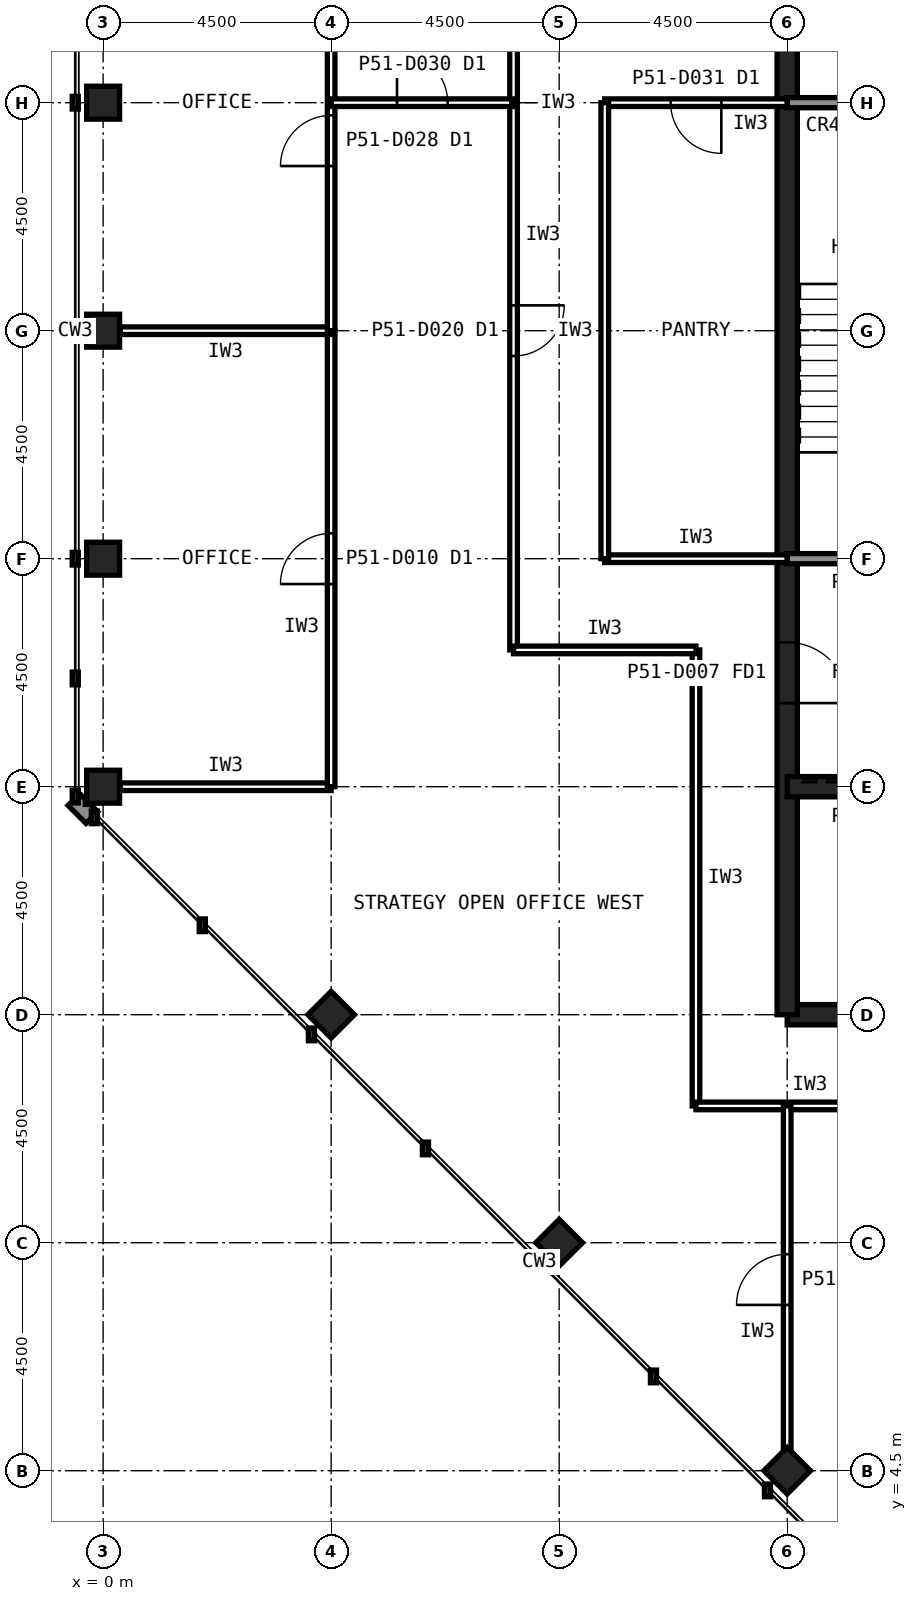
"""IFC4 building model, lengths in metres.
Left out: names, types, materials, properties, quantities, classifications, styles, units other than length and angle.
Written with IfcOpenShell. Run it as: python <this file> out.ifc"""

import sys

from ifc_helpers import new_model, si_unit, direction, frame, frame_2d, origin, origin_2d, place, context, subcontext, project, spatial, rectangle, hollow_rectangle, extrude, element, fill, save


model = new_model("IFC4")
c1 = context("Model", 3, precision=1e-05, world=origin(), true_north=direction((0.0, 1.0)))
c2 = subcontext(c1, "Body", "Model", "MODEL_VIEW")
j1 = project(units=[si_unit("LENGTHUNIT", "METRE"), si_unit("PLANEANGLEUNIT", "RADIAN")], contexts=[c1])
p1 = place(None, origin())
s1 = spatial("IfcSite", under=j1, at=p1, CompositionType="ELEMENT")
p2 = place(p1, origin())
s2 = spatial("IfcBuilding", under=s1, at=p2, CompositionType="ELEMENT")
p3 = place(p2, frame((0.0, 0.0, 214.6)))
s3 = spatial("IfcBuildingStorey", under=s2, at=p3, CompositionType="ELEMENT", Elevation=214.6)
for number, where, z_axis, x_axis in (
    (1, (0.0, 31.5, 0.0), (0.0, 0.0, 1.0), (1.0, 0.0, 0.0)),
    (2, (0.0, 27.0, 0.0), (0.0, 0.0, 1.0), (1.0, 0.0, 0.0)),
    (3, (0.0, 22.5, 0.0), (0.0, 0.0, 1.0), (1.0, 0.0, 0.0)),
    (4, (0.0, 18.0, 0.0), (0.0, 0.0, 1.0), (1.0, 0.0, 0.0)),
    (5, (13.5, 4.5, 0.0), (0.0, 0.0, 1.0), (0.707, 0.707, 0.0)),
    (6, (9.0, 9.0, 0.0), (0.0, 0.0, 1.0), (0.707, 0.707, 0.0)),
    (7, (4.5, 13.5, 0.0), (0.0, 0.0, 1.0), (0.707, 0.707, 0.0)),
):
    element("IfcColumn", number, at=place(p3, frame(where, z_axis=z_axis, x_axis=x_axis)), inside=s3, PredefinedType="COLUMN", context=c2, shape_type="SweptSolid", body=[
        extrude(hollow_rectangle(XDim=0.65, YDim=0.65, WallThickness=0.032, at=origin_2d()), origin(), (0.0, 0.0, 1.0), 4.0),
    ])
p4 = place(p3, frame((13.5, 13.5, 0.0), z_axis=(0.0, 0.0, 1.0), x_axis=(1.0, 0.0, 0.0)))
e8 = element("IfcWall", 8, at=p4, inside=s3, PredefinedType="SHEAR", context=c2, shape_type="SweptSolid", body=[
    extrude(rectangle(XDim=27.0, YDim=0.4, at=frame_2d((13.5, 0.0))), origin(), (0.0, 0.0, 1.0), 4.0),
])
p5 = place(p3, frame((13.5, 40.5, 0.0), z_axis=(0.0, 0.0, 1.0), x_axis=(0.0, -1.0, 0.0)))
e9 = element("IfcWall", 9, at=p5, inside=s3, PredefinedType="SHEAR", context=c2, shape_type="SweptSolid", body=[
    extrude(rectangle(XDim=27.0, YDim=0.4, at=frame_2d((13.5, 0.0))), origin(), (0.0, 0.0, 1.0), 4.0),
])
p6 = place(p5, frame((19.65, 0.0, 0.0)))
e10 = element("IfcOpeningElement", 10, at=p6, cuts=e9, PredefinedType="OPENING", context=c2, shape_type="SweptSolid", body=[
    extrude(rectangle(XDim=1.2, YDim=2.1, at=frame_2d((0.6, 1.05))), frame((0.0, 0.21, 0.0), z_axis=(0.0, -1.0, 0.0), x_axis=(1.0, 0.0, 0.0)), (0.0, 0.0, 1.0), 0.42),
])
p7 = place(p5, frame((5.85, 0.0, 0.0)))
e11 = element("IfcOpeningElement", 11, at=p7, cuts=e9, PredefinedType="OPENING", context=c2, shape_type="SweptSolid", body=[
    extrude(rectangle(XDim=1.8, YDim=2.1, at=frame_2d((0.9, 1.05))), frame((0.0, 0.21, 0.0), z_axis=(0.0, -1.0, 0.0), x_axis=(1.0, 0.0, 0.0)), (0.0, 0.0, 1.0), 0.42),
])
p8 = place(p3, frame((13.5, 18.0, 0.0), z_axis=(0.0, 0.0, 1.0), x_axis=(1.0, 0.0, 0.0)))
e12 = element("IfcWall", 12, at=p8, inside=s3, PredefinedType="SHEAR", context=c2, shape_type="SweptSolid", body=[
    extrude(rectangle(XDim=27.0, YDim=0.4, at=frame_2d((13.5, 0.0))), origin(), (0.0, 0.0, 1.0), 4.0),
])
p9 = place(p8, frame((24.3, 0.0, 0.0)))
e13 = element("IfcOpeningElement", 13, at=p9, cuts=e12, PredefinedType="OPENING", context=c2, shape_type="SweptSolid", body=[
    extrude(rectangle(XDim=0.9, YDim=2.1, at=frame_2d((0.45, 1.05))), frame((0.0, 0.21, 0.0), z_axis=(0.0, -1.0, 0.0), x_axis=(1.0, 0.0, 0.0)), (0.0, 0.0, 1.0), 0.42),
])
p10 = place(p8, frame((5.45, 0.0, 0.0)))
e14 = element("IfcOpeningElement", 14, at=p10, cuts=e12, PredefinedType="OPENING", context=c2, shape_type="SweptSolid", body=[
    extrude(rectangle(XDim=1.1, YDim=2.1, at=frame_2d((0.55, 1.05))), frame((0.0, 0.21, 0.0), z_axis=(0.0, -1.0, 0.0), x_axis=(1.0, 0.0, 0.0)), (0.0, 0.0, 1.0), 0.42),
])
p11 = place(p8, frame((8.45, 0.0, 0.0)))
e15 = element("IfcOpeningElement", 15, at=p11, cuts=e12, PredefinedType="OPENING", context=c2, shape_type="SweptSolid", body=[
    extrude(rectangle(XDim=1.1, YDim=2.1, at=frame_2d((0.55, 1.05))), frame((0.0, 0.21, 0.0), z_axis=(0.0, -1.0, 0.0), x_axis=(1.0, 0.0, 0.0)), (0.0, 0.0, 1.0), 0.42),
])
p12 = place(p8, frame((11.45, 0.0, 0.0)))
e16 = element("IfcOpeningElement", 16, at=p12, cuts=e12, PredefinedType="OPENING", context=c2, shape_type="SweptSolid", body=[
    extrude(rectangle(XDim=1.1, YDim=2.1, at=frame_2d((0.55, 1.05))), frame((0.0, 0.21, 0.0), z_axis=(0.0, -1.0, 0.0), x_axis=(1.0, 0.0, 0.0)), (0.0, 0.0, 1.0), 0.42),
])
p13 = place(p8, frame((14.45, 0.0, 0.0)))
e17 = element("IfcOpeningElement", 17, at=p13, cuts=e12, PredefinedType="OPENING", context=c2, shape_type="SweptSolid", body=[
    extrude(rectangle(XDim=1.1, YDim=2.1, at=frame_2d((0.55, 1.05))), frame((0.0, 0.21, 0.0), z_axis=(0.0, -1.0, 0.0), x_axis=(1.0, 0.0, 0.0)), (0.0, 0.0, 1.0), 0.42),
])
p14 = place(p8, frame((17.45, 0.0, 0.0)))
e18 = element("IfcOpeningElement", 18, at=p14, cuts=e12, PredefinedType="OPENING", context=c2, shape_type="SweptSolid", body=[
    extrude(rectangle(XDim=1.1, YDim=2.1, at=frame_2d((0.55, 1.05))), frame((0.0, 0.21, 0.0), z_axis=(0.0, -1.0, 0.0), x_axis=(1.0, 0.0, 0.0)), (0.0, 0.0, 1.0), 0.42),
])
p15 = place(p8, frame((20.45, 0.0, 0.0)))
e19 = element("IfcOpeningElement", 19, at=p15, cuts=e12, PredefinedType="OPENING", context=c2, shape_type="SweptSolid", body=[
    extrude(rectangle(XDim=1.1, YDim=2.1, at=frame_2d((0.55, 1.05))), frame((0.0, 0.21, 0.0), z_axis=(0.0, -1.0, 0.0), x_axis=(1.0, 0.0, 0.0)), (0.0, 0.0, 1.0), 0.42),
])
p16 = place(p8, frame((1.6, 0.0, 0.0)))
e20 = element("IfcOpeningElement", 20, at=p16, cuts=e12, PredefinedType="OPENING", context=c2, shape_type="SweptSolid", body=[
    extrude(rectangle(XDim=1.3, YDim=2.2, at=frame_2d((0.65, 1.1))), frame((0.0, 0.21, 0.0), z_axis=(0.0, -1.0, 0.0), x_axis=(1.0, 0.0, 0.0)), (0.0, 0.0, 1.0), 0.42),
])
p17 = place(p3, frame((13.5, 22.5, 0.0), z_axis=(0.0, 0.0, 1.0), x_axis=(1.0, 0.0, 0.0)))
e21 = element("IfcWall", 21, at=p17, inside=s3, PredefinedType="SOLIDWALL", context=c2, shape_type="SweptSolid", body=[
    extrude(rectangle(XDim=27.0, YDim=0.2, at=frame_2d((13.5, 0.0))), origin(), (0.0, 0.0, 1.0), 3.84),
])
p18 = place(p17, frame((1.65, 0.0, 0.0)))
e22 = element("IfcOpeningElement", 22, at=p18, cuts=e21, PredefinedType="OPENING", context=c2, shape_type="SweptSolid", body=[
    extrude(rectangle(XDim=1.2, YDim=2.1, at=frame_2d((0.6, 1.05))), frame((0.0, 0.11, 0.0), z_axis=(0.0, -1.0, 0.0), x_axis=(1.0, 0.0, 0.0)), (0.0, 0.0, 1.0), 0.22),
])
p19 = place(p17, frame((6.025, 0.0, 0.0)))
e23 = element("IfcOpeningElement", 23, at=p19, cuts=e21, PredefinedType="OPENING", context=c2, shape_type="SweptSolid", body=[
    extrude(rectangle(XDim=1.0, YDim=2.1, at=frame_2d((0.5, 1.05))), frame((0.0, 0.11, 0.0), z_axis=(0.0, -1.0, 0.0), x_axis=(1.0, 0.0, 0.0)), (0.0, 0.0, 1.0), 0.22),
])
p20 = place(p17, frame((10.525, 0.0, 0.0)))
e24 = element("IfcOpeningElement", 24, at=p20, cuts=e21, PredefinedType="OPENING", context=c2, shape_type="SweptSolid", body=[
    extrude(rectangle(XDim=1.0, YDim=2.1, at=frame_2d((0.5, 1.05))), frame((0.0, 0.11, 0.0), z_axis=(0.0, -1.0, 0.0), x_axis=(1.0, 0.0, 0.0)), (0.0, 0.0, 1.0), 0.22),
])
p21 = place(p17, frame((19.75, 0.0, 0.0)))
e25 = element("IfcOpeningElement", 25, at=p21, cuts=e21, PredefinedType="OPENING", context=c2, shape_type="SweptSolid", body=[
    extrude(rectangle(XDim=1.0, YDim=2.1, at=frame_2d((0.5, 1.05))), frame((0.0, 0.11, 0.0), z_axis=(0.0, -1.0, 0.0), x_axis=(1.0, 0.0, 0.0)), (0.0, 0.0, 1.0), 0.22),
])
p22 = place(p17, frame((15.05, 0.0, 0.0)))
e26 = element("IfcOpeningElement", 26, at=p22, cuts=e21, PredefinedType="OPENING", context=c2, shape_type="SweptSolid", body=[
    extrude(rectangle(XDim=1.4, YDim=2.4, at=frame_2d((0.7, 1.2))), frame((0.0, 0.11, 0.0), z_axis=(0.0, -1.0, 0.0), x_axis=(1.0, 0.0, 0.0)), (0.0, 0.0, 1.0), 0.22),
])
p23 = place(p3, frame((13.5, 31.5, 0.0), z_axis=(0.0, 0.0, 1.0), x_axis=(1.0, 0.0, 0.0)))
e27 = element("IfcWall", 27, at=p23, inside=s3, PredefinedType="SOLIDWALL", context=c2, shape_type="SweptSolid", body=[
    extrude(rectangle(XDim=27.0, YDim=0.2, at=frame_2d((13.5, 0.0))), origin(), (0.0, 0.0, 1.0), 3.84),
])
p24 = place(p23, frame((24.15, 0.0, 0.0)))
e28 = element("IfcOpeningElement", 28, at=p24, cuts=e27, PredefinedType="OPENING", context=c2, shape_type="SweptSolid", body=[
    extrude(rectangle(XDim=1.2, YDim=2.1, at=frame_2d((0.6, 1.05))), frame((0.0, 0.11, 0.0), z_axis=(0.0, -1.0, 0.0), x_axis=(1.0, 0.0, 0.0)), (0.0, 0.0, 1.0), 0.22),
])
p25 = place(p23, frame((15.3, 0.0, 0.0)))
e29 = element("IfcOpeningElement", 29, at=p25, cuts=e27, PredefinedType="OPENING", context=c2, shape_type="SweptSolid", body=[
    extrude(rectangle(XDim=0.9, YDim=2.1, at=frame_2d((0.45, 1.05))), frame((0.0, 0.11, 0.0), z_axis=(0.0, -1.0, 0.0), x_axis=(1.0, 0.0, 0.0)), (0.0, 0.0, 1.0), 0.22),
])
p26 = place(p23, frame((19.8, 0.0, 0.0)))
e30 = element("IfcOpeningElement", 30, at=p26, cuts=e27, PredefinedType="OPENING", context=c2, shape_type="SweptSolid", body=[
    extrude(rectangle(XDim=0.9, YDim=2.1, at=frame_2d((0.45, 1.05))), frame((0.0, 0.11, 0.0), z_axis=(0.0, -1.0, 0.0), x_axis=(1.0, 0.0, 0.0)), (0.0, 0.0, 1.0), 0.22),
])
p27 = place(p3, frame((8.1, 33.3, 0.0), z_axis=(0.0, 0.0, 1.0), x_axis=(0.0, -1.0, 0.0)))
e31 = element("IfcWall", 31, at=p27, inside=s3, PredefinedType="PARTITIONING", context=c2, shape_type="SweptSolid", body=[
    extrude(rectangle(XDim=12.6, YDim=0.15, at=frame_2d((6.3, 0.0))), origin(), (0.0, 0.0, 1.0), 3.84),
])
p28 = place(p27, frame((5.8, 0.0, 0.0)))
e32 = element("IfcOpeningElement", 32, at=p28, cuts=e31, PredefinedType="OPENING", context=c2, shape_type="SweptSolid", body=[
    extrude(rectangle(XDim=1.0, YDim=2.1, at=frame_2d((0.5, 1.05))), frame((0.0, 0.085, 0.0), z_axis=(0.0, -1.0, 0.0), x_axis=(1.0, 0.0, 0.0)), (0.0, 0.0, 1.0), 0.17),
])
p29 = place(p3, frame((11.7, 20.7, 0.0), z_axis=(0.0, 0.0, 1.0), x_axis=(0.0, -1.0, 0.0)))
e33 = element("IfcWall", 33, at=p29, inside=s3, PredefinedType="PARTITIONING", context=c2, shape_type="SweptSolid", body=[
    extrude(rectangle(XDim=9.0, YDim=0.15, at=frame_2d((4.5, 0.0))), origin(), (0.0, 0.0, 1.0), 3.84),
])
p30 = place(p3, frame((11.7, 11.7, 0.0), z_axis=(0.0, 0.0, 1.0), x_axis=(1.0, 0.0, 0.0)))
e34 = element("IfcWall", 34, at=p30, inside=s3, PredefinedType="PARTITIONING", context=c2, shape_type="SweptSolid", body=[
    extrude(rectangle(XDim=4.5, YDim=0.15, at=frame_2d((2.25, 0.0))), origin(), (0.0, 0.0, 1.0), 3.84),
])
p31 = place(p3, frame((8.1, 20.7, 0.0), z_axis=(0.0, 0.0, 1.0), x_axis=(1.0, 0.0, 0.0)))
e35 = element("IfcWall", 35, at=p31, inside=s3, PredefinedType="PARTITIONING", context=c2, shape_type="SweptSolid", body=[
    extrude(rectangle(XDim=3.6, YDim=0.15, at=frame_2d((1.8, 0.0))), origin(), (0.0, 0.0, 1.0), 3.84),
])
p32 = place(p3, frame((9.9, 22.5, 0.0), z_axis=(0.0, 0.0, 1.0), x_axis=(1.0, 0.0, 0.0)))
e36 = element("IfcWall", 36, at=p32, inside=s3, PredefinedType="PARTITIONING", context=c2, shape_type="SweptSolid", body=[
    extrude(rectangle(XDim=3.6, YDim=0.15, at=frame_2d((1.8, 0.0))), origin(), (0.0, 0.0, 1.0), 2.989),
])
p33 = place(p3, frame((13.5, 31.5, 0.0), z_axis=(0.0, 0.0, 1.0), x_axis=(-1.0, 0.0, 0.0)))
e37 = element("IfcWall", 37, at=p33, inside=s3, PredefinedType="PARTITIONING", context=c2, shape_type="SweptSolid", body=[
    extrude(rectangle(XDim=3.6, YDim=0.15, at=frame_2d((1.8, 0.0))), origin(), (0.0, 0.0, 1.0), 2.989),
])
p34 = place(p33, frame((1.3, 0.0, 0.0)))
e38 = element("IfcOpeningElement", 38, at=p34, cuts=e37, PredefinedType="OPENING", context=c2, shape_type="SweptSolid", body=[
    extrude(rectangle(XDim=1.0, YDim=2.1, at=frame_2d((0.5, 1.05))), frame((0.0, 0.085, 0.0), z_axis=(0.0, -1.0, 0.0), x_axis=(1.0, 0.0, 0.0)), (0.0, 0.0, 1.0), 0.17),
])
p35 = place(p3, frame((9.9, 31.5, 0.0), z_axis=(0.0, 0.0, 1.0), x_axis=(0.0, -1.0, 0.0)))
e39 = element("IfcWall", 39, at=p35, inside=s3, PredefinedType="PARTITIONING", context=c2, shape_type="SweptSolid", body=[
    extrude(rectangle(XDim=9.0, YDim=0.15, at=frame_2d((4.5, 0.0))), origin(), (0.0, 0.0, 1.0), 3.84),
])
p36 = place(p3, frame((0.335, 18.0, 0.0), z_axis=(0.0, 0.0, 1.0), x_axis=(1.0, 0.0, 0.0)))
e40 = element("IfcWall", 40, at=p36, inside=s3, PredefinedType="PARTITIONING", context=c2, shape_type="SweptSolid", body=[
    extrude(rectangle(XDim=4.165, YDim=0.15, at=frame_2d((2.083, 0.0))), origin(), (0.0, 0.0, 1.0), 2.989),
])
p37 = place(p3, frame((4.5, 18.0, 0.0), z_axis=(0.0, 0.0, 1.0), x_axis=(0.0, 1.0, 0.0)))
e41 = element("IfcWall", 41, at=p37, inside=s3, PredefinedType="PARTITIONING", context=c2, shape_type="SweptSolid", body=[
    extrude(rectangle(XDim=9.0, YDim=0.15, at=frame_2d((4.5, 0.0))), origin(), (0.0, 0.0, 1.0), 3.84),
])
p38 = place(p37, frame((4.0, 0.0, 0.0)))
e42 = element("IfcOpeningElement", 42, at=p38, cuts=e41, PredefinedType="OPENING", context=c2, shape_type="SweptSolid", body=[
    extrude(rectangle(XDim=1.0, YDim=2.1, at=frame_2d((0.5, 1.05))), frame((0.0, 0.085, 0.0), z_axis=(0.0, -1.0, 0.0), x_axis=(1.0, 0.0, 0.0)), (0.0, 0.0, 1.0), 0.17),
])
p39 = place(p3, frame((4.5, 27.0, 0.0), z_axis=(0.0, 0.0, 1.0), x_axis=(-1.0, 0.0, 0.0)))
e43 = element("IfcWall", 43, at=p39, inside=s3, PredefinedType="PARTITIONING", context=c2, shape_type="SweptSolid", body=[
    extrude(rectangle(XDim=4.165, YDim=0.15, at=frame_2d((2.083, 0.0))), origin(), (0.0, 0.0, 1.0), 2.989),
])
p40 = place(p3, frame((4.5, 27.0, 0.0), z_axis=(0.0, 0.0, 1.0), x_axis=(0.0, 1.0, 0.0)))
e44 = element("IfcWall", 44, at=p40, inside=s3, PredefinedType="PARTITIONING", context=c2, shape_type="SweptSolid", body=[
    extrude(rectangle(XDim=9.0, YDim=0.15, at=frame_2d((4.5, 0.0))), origin(), (0.0, 0.0, 1.0), 3.84),
])
p41 = place(p40, frame((3.25, 0.0, 0.0)))
e45 = element("IfcOpeningElement", 45, at=p41, cuts=e44, PredefinedType="OPENING", context=c2, shape_type="SweptSolid", body=[
    extrude(rectangle(XDim=1.0, YDim=2.1, at=frame_2d((0.5, 1.05))), frame((0.0, 0.085, 0.0), z_axis=(0.0, -1.0, 0.0), x_axis=(1.0, 0.0, 0.0)), (0.0, 0.0, 1.0), 0.17),
])
p42 = place(p3, frame((13.5, 4.845, 0.0), z_axis=(0.0, 0.0, 1.0), x_axis=(0.0, 1.0, 0.0)))
e46 = element("IfcWall", 46, at=p42, inside=s3, PredefinedType="PARTITIONING", context=c2, shape_type="SweptSolid", body=[
    extrude(rectangle(XDim=6.855, YDim=0.15, at=frame_2d((3.427, 0.0))), origin(), (0.0, 0.0, 1.0), 2.989),
])
p43 = place(p42, frame((2.927, 0.0, 0.0)))
e47 = element("IfcOpeningElement", 47, at=p43, cuts=e46, PredefinedType="OPENING", context=c2, shape_type="SweptSolid", body=[
    extrude(rectangle(XDim=1.0, YDim=2.1, at=frame_2d((0.5, 1.05))), frame((0.0, 0.085, 0.0), z_axis=(0.0, -1.0, 0.0), x_axis=(1.0, 0.0, 0.0)), (0.0, 0.0, 1.0), 0.17),
])
p44 = place(p3, frame((4.5, 31.5, 0.0), z_axis=(0.0, 0.0, 1.0), x_axis=(1.0, 0.0, 0.0)))
e48 = element("IfcWall", 48, at=p44, inside=s3, PredefinedType="PARTITIONING", context=c2, shape_type="SweptSolid", body=[
    extrude(rectangle(XDim=3.6, YDim=0.15, at=frame_2d((1.8, 0.0))), origin(), (0.0, 0.0, 1.0), 2.989),
])
p45 = place(p44, frame((1.3, 0.0, 0.0)))
e49 = element("IfcOpeningElement", 49, at=p45, cuts=e48, PredefinedType="OPENING", context=c2, shape_type="SweptSolid", body=[
    extrude(rectangle(XDim=1.0, YDim=2.1, at=frame_2d((0.5, 1.05))), frame((0.0, 0.085, 0.0), z_axis=(0.0, -1.0, 0.0), x_axis=(1.0, 0.0, 0.0)), (0.0, 0.0, 1.0), 0.17),
])
p46 = place(p6, origin())
e50 = element("IfcDoor", 50, at=p46, inside=s3, OperationType="SINGLE_SWING_RIGHT", PredefinedType="DOOR", context=c2, shape_type="SweptSolid", body=[
    extrude(rectangle(XDim=1.2, YDim=2.1, at=frame_2d((0.6, 1.05))), frame((0.0, 0.025, 0.0), z_axis=(0.0, -1.0, 0.0), x_axis=(1.0, 0.0, 0.0)), (0.0, 0.0, 1.0), 0.05),
])
fill(e10, e50)
p47 = place(p28, origin())
e51 = element("IfcDoor", 51, at=p47, inside=s3, OperationType="SINGLE_SWING_LEFT", PredefinedType="DOOR", context=c2, shape_type="SweptSolid", body=[
    extrude(rectangle(XDim=1.0, YDim=2.1, at=frame_2d((0.5, 1.05))), frame((0.0, 0.025, 0.0), z_axis=(0.0, -1.0, 0.0), x_axis=(1.0, 0.0, 0.0)), (0.0, 0.0, 1.0), 0.05),
])
fill(e32, e51)
p48 = place(p34, origin())
e52 = element("IfcDoor", 52, at=p48, inside=s3, OperationType="SINGLE_SWING_LEFT", PredefinedType="DOOR", context=c2, shape_type="SweptSolid", body=[
    extrude(rectangle(XDim=1.0, YDim=2.1, at=frame_2d((0.5, 1.05))), frame((0.0, 0.025, 0.0), z_axis=(0.0, -1.0, 0.0), x_axis=(1.0, 0.0, 0.0)), (0.0, 0.0, 1.0), 0.05),
])
fill(e38, e52)
p49 = place(p38, origin())
e53 = element("IfcDoor", 53, at=p49, inside=s3, OperationType="SINGLE_SWING_LEFT", PredefinedType="DOOR", context=c2, shape_type="SweptSolid", body=[
    extrude(rectangle(XDim=1.0, YDim=2.1, at=frame_2d((0.5, 1.05))), frame((0.0, 0.025, 0.0), z_axis=(0.0, -1.0, 0.0), x_axis=(1.0, 0.0, 0.0)), (0.0, 0.0, 1.0), 0.05),
])
fill(e42, e53)
p50 = place(p41, origin())
e54 = element("IfcDoor", 54, at=p50, inside=s3, OperationType="SINGLE_SWING_LEFT", PredefinedType="DOOR", context=c2, shape_type="SweptSolid", body=[
    extrude(rectangle(XDim=1.0, YDim=2.1, at=frame_2d((0.5, 1.05))), frame((0.0, 0.025, 0.0), z_axis=(0.0, -1.0, 0.0), x_axis=(1.0, 0.0, 0.0)), (0.0, 0.0, 1.0), 0.05),
])
fill(e45, e54)
p51 = place(p43, origin())
e55 = element("IfcDoor", 55, at=p51, inside=s3, OperationType="SINGLE_SWING_LEFT", PredefinedType="DOOR", context=c2, shape_type="SweptSolid", body=[
    extrude(rectangle(XDim=1.0, YDim=2.1, at=frame_2d((0.5, 1.05))), frame((0.0, 0.025, 0.0), z_axis=(0.0, -1.0, 0.0), x_axis=(1.0, 0.0, 0.0)), (0.0, 0.0, 1.0), 0.05),
])
fill(e47, e55)
p52 = place(p45, origin())
e56 = element("IfcDoor", 56, at=p52, inside=s3, OperationType="SINGLE_SWING_LEFT", PredefinedType="DOOR", context=c2, shape_type="SweptSolid", body=[
    extrude(rectangle(XDim=1.0, YDim=2.1, at=frame_2d((0.5, 1.05))), frame((0.0, 0.025, 0.0), z_axis=(0.0, -1.0, 0.0), x_axis=(1.0, 0.0, 0.0)), (0.0, 0.0, 1.0), 0.05),
])
fill(e49, e56)
save(model, sys.argv[1])
